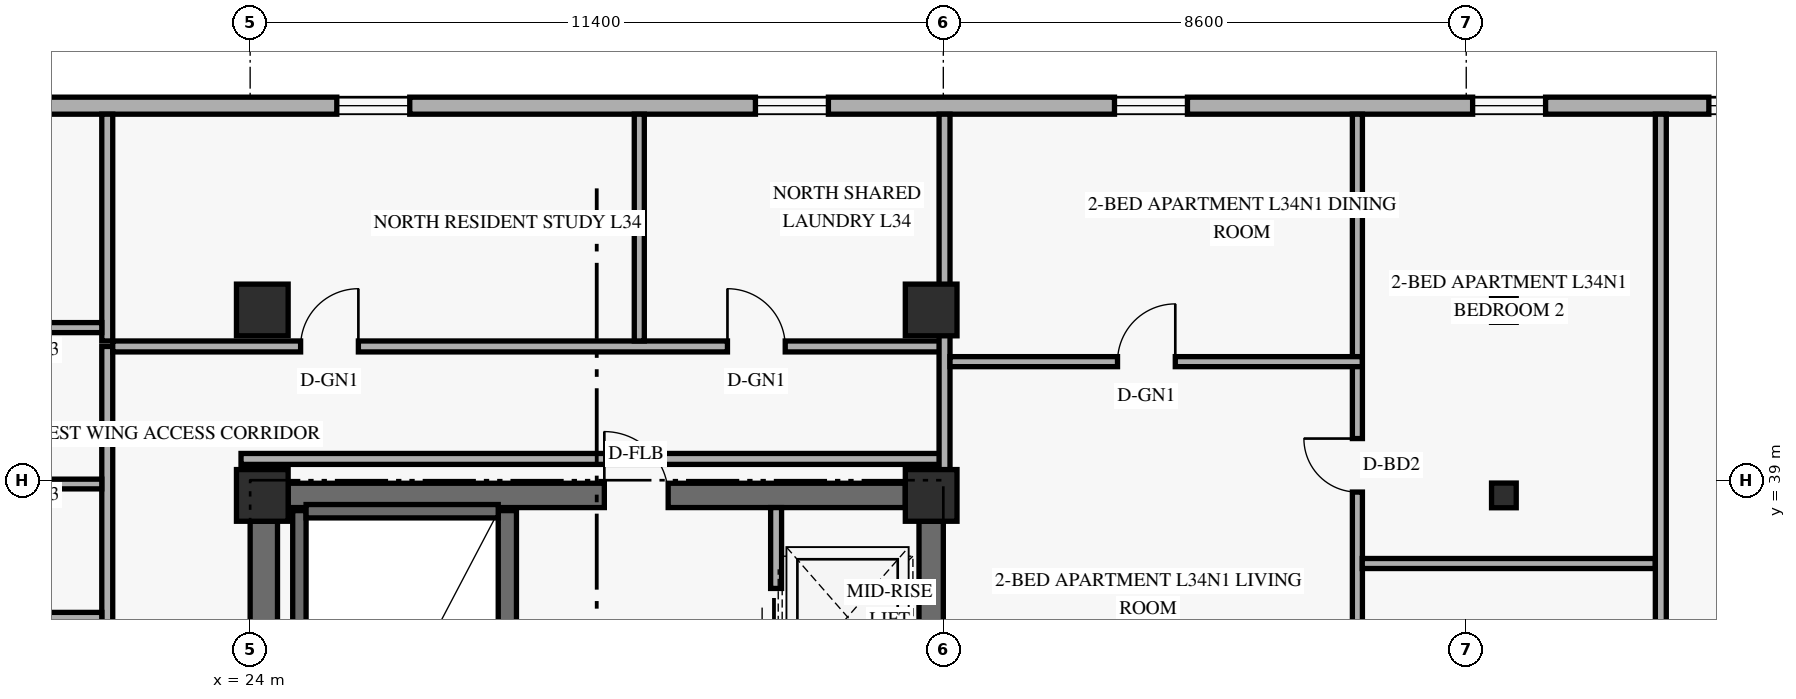
"""IFC4 building model, lengths in metres.
Left out: names, types, materials, properties, quantities, classifications, styles, units other than length and angle.
Written with IfcOpenShell. Run it as: python <this file> out.ifc"""

import sys

from ifc_helpers import new_model, si_unit, direction, frame, frame_2d, origin, origin_2d, place, context, subcontext, project, spatial, rectangle, hollow_rectangle, extrude, element, fill, save


model = new_model("IFC4")
c1 = context("Model", 3, precision=1e-05, world=origin(), true_north=direction((0.0, 1.0)))
c2 = subcontext(c1, "Body", "Model", "MODEL_VIEW")
j1 = project(units=[si_unit("LENGTHUNIT", "METRE"), si_unit("PLANEANGLEUNIT", "RADIAN")], contexts=[c1])
p1 = place(None, origin())
s1 = spatial("IfcSite", under=j1, at=p1, CompositionType="ELEMENT")
p2 = place(p1, origin())
s2 = spatial("IfcBuilding", under=s1, at=p2, CompositionType="ELEMENT")
p3 = place(p2, frame((0.0, 0.0, 132.0)))
s3 = spatial("IfcBuildingStorey", under=s2, at=p3, CompositionType="ELEMENT", Elevation=132.0)
p4 = place(p3, frame((24.225, 30.625, 0.0), z_axis=(0.0, 0.0, 1.0), x_axis=(0.0, 1.0, 0.0)))
e1 = element("IfcWall", 1, at=p4, inside=s3, PredefinedType="SHEAR", context=c2, shape_type="SweptSolid", body=[
    extrude(rectangle(XDim=7.7, YDim=0.45, at=frame_2d((3.85, 0.0))), origin(), (0.0, 0.0, 1.0), 2.689),
])
p5 = place(p3, frame((35.2, 31.35, 0.0), z_axis=(0.0, 0.0, 1.0), x_axis=(0.0, 1.0, 0.0)))
e2 = element("IfcWall", 2, at=p5, inside=s3, PredefinedType="SHEAR", context=c2, shape_type="SweptSolid", body=[
    extrude(rectangle(XDim=6.975, YDim=0.4, at=frame_2d((3.487, 0.0))), origin(), (0.0, 0.0, 1.0), 2.689),
])
p6 = place(p3, frame((24.625, 38.75, 0.0), z_axis=(0.0, 0.0, 1.0), x_axis=(1.0, 0.0, 0.0)))
e3 = element("IfcWall", 3, at=p6, inside=s3, PredefinedType="SHEAR", context=c2, shape_type="SweptSolid", body=[
    extrude(rectangle(XDim=10.15, YDim=0.4, at=frame_2d((5.075, 0.0))), origin(), (0.0, 0.0, 1.0), 3.3),
])
p7 = place(p6, frame((5.2, 0.0, 0.0)))
e4 = element("IfcOpeningElement", 4, at=p7, cuts=e3, PredefinedType="OPENING", context=c2, shape_type="SweptSolid", body=[
    extrude(rectangle(XDim=1.05, YDim=2.15, at=frame_2d((0.525, 1.075))), frame((0.0, 0.21, 0.0), z_axis=(0.0, -1.0, 0.0), x_axis=(1.0, 0.0, 0.0)), (0.0, 0.0, 1.0), 0.42),
])
p8 = place(p3, frame((24.81, 30.74, 0.0), z_axis=(0.0, 0.0, 1.0), x_axis=(0.0, 1.0, 0.0)))
e5 = element("IfcWall", 5, at=p8, inside=s3, PredefinedType="SHEAR", context=c2, shape_type="SweptSolid", body=[
    extrude(rectangle(XDim=7.76, YDim=0.22, at=frame_2d((3.88, 0.0))), origin(), (0.0, 0.0, 1.0), 3.3),
])
p9 = place(p3, frame((28.23, 30.74, 0.0), z_axis=(0.0, 0.0, 1.0), x_axis=(0.0, 1.0, 0.0)))
e6 = element("IfcWall", 6, at=p9, inside=s3, PredefinedType="SHEAR", context=c2, shape_type="SweptSolid", body=[
    extrude(rectangle(XDim=7.76, YDim=0.3, at=frame_2d((3.88, 0.0))), origin(), (0.0, 0.0, 1.0), 3.3),
])
p10 = place(p3, frame((24.92, 38.49, 0.0), z_axis=(0.0, 0.0, 1.0), x_axis=(1.0, 0.0, 0.0)))
e7 = element("IfcWall", 7, at=p10, inside=s3, PredefinedType="SHEAR", context=c2, shape_type="SweptSolid", body=[
    extrude(rectangle(XDim=3.16, YDim=0.22, at=frame_2d((1.58, 0.0))), origin(), (0.0, 0.0, 1.0), 3.3),
])
for number, where, z_axis, x_axis in (
    (8, (24.2, 38.75, 0.0), (0.0, 0.0, 1.0), (1.0, 0.0, 0.0)),
    (9, (24.2, 41.8, 0.0), (0.0, 0.0, 1.0), (1.0, 0.0, 0.0)),
    (10, (35.2, 38.75, 0.0), (0.0, 0.0, 1.0), (1.0, 0.0, 0.0)),
    (11, (35.2, 41.8, 0.0), (0.0, 0.0, 1.0), (1.0, 0.0, 0.0)),
):
    element("IfcColumn", number, at=place(p3, frame(where, z_axis=z_axis, x_axis=x_axis)), inside=s3, PredefinedType="COLUMN", context=c2, shape_type="SweptSolid", body=[
        extrude(rectangle(XDim=0.85, YDim=0.85, at=origin_2d()), origin(), (0.0, 0.0, 1.0), 3.6),
    ])
for number, where, z_axis, x_axis in (
    (12, (44.556, 38.75, 0.0), (0.035, 0.0, 0.999), (0.0, 1.0, 0.0)),
    (13, (44.556, 41.8, 0.0), (0.035, 0.0, 0.999), (0.0, 1.0, 0.0)),
):
    element("IfcColumn", number, at=place(p3, frame(where, z_axis=z_axis, x_axis=x_axis)), inside=s3, PredefinedType="COLUMN", context=c2, shape_type="SweptSolid", body=[
        extrude(hollow_rectangle(XDim=0.406, YDim=0.406, WallThickness=0.016, at=origin_2d()), origin(), (0.0, 0.0, 1.0), 3.602),
    ])
p11 = place(p3, frame((49.98, 45.16, 0.0), z_axis=(0.0, 0.0, 1.0), x_axis=(-1.0, 0.0, 0.0)))
e14 = element("IfcWall", 14, at=p11, inside=s3, PredefinedType="SOLIDWALL", context=c2, shape_type="SweptSolid", body=[
    extrude(rectangle(XDim=36.56, YDim=0.28, at=frame_2d((18.28, 0.0))), origin(), (0.0, 0.0, 1.0), 3.3),
])
p12 = place(p11, frame((31.845, 0.0, 0.85)))
e15 = element("IfcOpeningElement", 15, at=p12, cuts=e14, PredefinedType="OPENING", context=c2, shape_type="SweptSolid", body=[
    extrude(rectangle(XDim=1.2, YDim=1.5, at=frame_2d((0.6, 0.75))), frame((0.0, 0.15, 0.0), z_axis=(0.0, -1.0, 0.0), x_axis=(1.0, 0.0, 0.0)), (0.0, 0.0, 1.0), 0.3),
])
p13 = place(p11, frame((23.355, 0.0, 0.85)))
e16 = element("IfcOpeningElement", 16, at=p13, cuts=e14, PredefinedType="OPENING", context=c2, shape_type="SweptSolid", body=[
    extrude(rectangle(XDim=1.2, YDim=1.5, at=frame_2d((0.6, 0.75))), frame((0.0, 0.15, 0.0), z_axis=(0.0, -1.0, 0.0), x_axis=(1.0, 0.0, 0.0)), (0.0, 0.0, 1.0), 0.3),
])
p14 = place(p11, frame((16.47, 0.0, 0.85)))
e17 = element("IfcOpeningElement", 17, at=p14, cuts=e14, PredefinedType="OPENING", context=c2, shape_type="SweptSolid", body=[
    extrude(rectangle(XDim=1.2, YDim=1.5, at=frame_2d((0.6, 0.75))), frame((0.0, 0.15, 0.0), z_axis=(0.0, -1.0, 0.0), x_axis=(1.0, 0.0, 0.0)), (0.0, 0.0, 1.0), 0.3),
])
p15 = place(p11, frame((10.565, 0.0, 0.85)))
e18 = element("IfcOpeningElement", 18, at=p15, cuts=e14, PredefinedType="OPENING", context=c2, shape_type="SweptSolid", body=[
    extrude(rectangle(XDim=1.2, YDim=1.5, at=frame_2d((0.6, 0.75))), frame((0.0, 0.15, 0.0), z_axis=(0.0, -1.0, 0.0), x_axis=(1.0, 0.0, 0.0)), (0.0, 0.0, 1.0), 0.3),
])
p16 = place(p11, frame((4.675, 0.0, 0.85)))
e19 = element("IfcOpeningElement", 19, at=p16, cuts=e14, PredefinedType="OPENING", context=c2, shape_type="SweptSolid", body=[
    extrude(rectangle(XDim=1.2, YDim=1.5, at=frame_2d((0.6, 0.75))), frame((0.0, 0.15, 0.0), z_axis=(0.0, -1.0, 0.0), x_axis=(1.0, 0.0, 0.0)), (0.0, 0.0, 1.0), 0.3),
])
p17 = place(p11, frame((0.79, 0.0, 0.85)))
e20 = element("IfcOpeningElement", 20, at=p17, cuts=e14, PredefinedType="OPENING", context=c2, shape_type="SweptSolid", body=[
    extrude(rectangle(XDim=1.2, YDim=1.5, at=frame_2d((0.6, 0.75))), frame((0.0, 0.15, 0.0), z_axis=(0.0, -1.0, 0.0), x_axis=(1.0, 0.0, 0.0)), (0.0, 0.0, 1.0), 0.3),
])
p18 = place(p3, frame((32.65, 31.35, 0.0), z_axis=(0.0, 0.0, 1.0), x_axis=(0.0, 1.0, 0.0)))
e21 = element("IfcWall", 21, at=p18, inside=s3, PredefinedType="STANDARD", context=c2, shape_type="SweptSolid", body=[
    extrude(rectangle(XDim=7.2, YDim=0.18, at=frame_2d((3.6, 0.0))), origin(), (0.0, 0.0, 1.0), 3.3),
])
p19 = place(p18, frame((0.52, 0.0, 0.0)))
e22 = element("IfcOpeningElement", 22, at=p19, cuts=e21, PredefinedType="OPENING", context=c2, shape_type="SweptSolid", body=[
    extrude(rectangle(XDim=1.05, YDim=2.2, at=frame_2d((0.525, 1.1))), frame((0.0, 0.1, 0.0), z_axis=(0.0, -1.0, 0.0), x_axis=(1.0, 0.0, 0.0)), (0.0, 0.0, 1.0), 0.2),
])
p20 = place(p18, frame((2.67, 0.0, 0.0)))
e23 = element("IfcOpeningElement", 23, at=p20, cuts=e21, PredefinedType="OPENING", context=c2, shape_type="SweptSolid", body=[
    extrude(rectangle(XDim=1.05, YDim=2.2, at=frame_2d((0.525, 1.1))), frame((0.0, 0.1, 0.0), z_axis=(0.0, -1.0, 0.0), x_axis=(1.0, 0.0, 0.0)), (0.0, 0.0, 1.0), 0.2),
])
p21 = place(p18, frame((4.82, 0.0, 0.0)))
e24 = element("IfcOpeningElement", 24, at=p21, cuts=e21, PredefinedType="OPENING", context=c2, shape_type="SweptSolid", body=[
    extrude(rectangle(XDim=1.05, YDim=2.2, at=frame_2d((0.525, 1.1))), frame((0.0, 0.1, 0.0), z_axis=(0.0, -1.0, 0.0), x_axis=(1.0, 0.0, 0.0)), (0.0, 0.0, 1.0), 0.2),
])
p22 = place(p3, frame((21.65, 6.8, 0.0), z_axis=(0.0, 0.0, 1.0), x_axis=(0.0, 1.0, 0.0)))
e25 = element("IfcWall", 25, at=p22, inside=s3, PredefinedType="STANDARD", context=c2, shape_type="SweptSolid", body=[
    extrude(rectangle(XDim=34.4, YDim=0.18, at=frame_2d((17.2, 0.0))), origin(), (0.0, 0.0, 1.0), 2.671),
])
p23 = place(p22, frame((5.107, 0.0, 0.0)))
e26 = element("IfcOpeningElement", 26, at=p23, cuts=e25, PredefinedType="OPENING", context=c2, shape_type="SweptSolid", body=[
    extrude(rectangle(XDim=0.92, YDim=2.15, at=frame_2d((0.46, 1.075))), frame((0.0, 0.1, 0.0), z_axis=(0.0, -1.0, 0.0), x_axis=(1.0, 0.0, 0.0)), (0.0, 0.0, 1.0), 0.2),
])
p24 = place(p22, frame((13.99, 0.0, 0.0)))
e27 = element("IfcOpeningElement", 27, at=p24, cuts=e25, PredefinedType="OPENING", context=c2, shape_type="SweptSolid", body=[
    extrude(rectangle(XDim=0.92, YDim=2.15, at=frame_2d((0.46, 1.075))), frame((0.0, 0.1, 0.0), z_axis=(0.0, -1.0, 0.0), x_axis=(1.0, 0.0, 0.0)), (0.0, 0.0, 1.0), 0.2),
])
p25 = place(p22, frame((28.646, 0.0, 0.0)))
e28 = element("IfcOpeningElement", 28, at=p25, cuts=e25, PredefinedType="OPENING", context=c2, shape_type="SweptSolid", body=[
    extrude(rectangle(XDim=0.92, YDim=2.15, at=frame_2d((0.46, 1.075))), frame((0.0, 0.1, 0.0), z_axis=(0.0, -1.0, 0.0), x_axis=(1.0, 0.0, 0.0)), (0.0, 0.0, 1.0), 0.2),
])
p26 = place(p3, frame((21.74, 41.2, 0.0), z_axis=(0.0, 0.0, 1.0), x_axis=(1.0, 0.0, 0.0)))
e29 = element("IfcWall", 29, at=p26, inside=s3, PredefinedType="STANDARD", context=c2, shape_type="SweptSolid", body=[
    extrude(rectangle(XDim=13.68, YDim=0.18, at=frame_2d((6.84, 0.0))), origin(), (0.0, 0.0, 1.0), 2.671),
])
p27 = place(p26, frame((3.09, 0.0, 0.0)))
e30 = element("IfcOpeningElement", 30, at=p27, cuts=e29, PredefinedType="OPENING", context=c2, shape_type="SweptSolid", body=[
    extrude(rectangle(XDim=0.95, YDim=2.15, at=frame_2d((0.475, 1.075))), frame((0.0, 0.1, 0.0), z_axis=(0.0, -1.0, 0.0), x_axis=(1.0, 0.0, 0.0)), (0.0, 0.0, 1.0), 0.2),
])
p28 = place(p26, frame((10.11, 0.0, 0.0)))
e31 = element("IfcOpeningElement", 31, at=p28, cuts=e29, PredefinedType="OPENING", context=c2, shape_type="SweptSolid", body=[
    extrude(rectangle(XDim=0.95, YDim=2.15, at=frame_2d((0.475, 1.075))), frame((0.0, 0.1, 0.0), z_axis=(0.0, -1.0, 0.0), x_axis=(1.0, 0.0, 0.0)), (0.0, 0.0, 1.0), 0.2),
])
p29 = place(p3, frame((23.85, 39.35, 0.0), z_axis=(0.0, 0.0, 1.0), x_axis=(1.0, 0.0, 0.0)))
e32 = element("IfcWall", 32, at=p29, inside=s3, PredefinedType="STANDARD", context=c2, shape_type="SweptSolid", body=[
    extrude(rectangle(XDim=11.57, YDim=0.18, at=frame_2d((5.785, 0.0))), origin(), (0.0, 0.0, 1.0), 2.671),
])
p30 = place(p3, frame((21.65, 41.29, 0.0), z_axis=(0.0, 0.0, 1.0), x_axis=(0.0, 1.0, 0.0)))
e33 = element("IfcWall", 33, at=p30, inside=s3, PredefinedType="PARTITIONING", context=c2, shape_type="SweptSolid", body=[
    extrude(rectangle(XDim=3.73, YDim=0.18, at=frame_2d((1.865, 0.0))), origin(), (0.0, 0.0, 1.0), 2.749),
])
p31 = place(p3, frame((35.42, 38.75, 0.0), z_axis=(0.0, 0.0, 1.0), x_axis=(0.0, 1.0, 0.0)))
e34 = element("IfcWall", 34, at=p31, inside=s3, PredefinedType="PARTITIONING", context=c2, shape_type="SweptSolid", body=[
    extrude(rectangle(XDim=6.27, YDim=0.18, at=frame_2d((3.135, 0.0))), origin(), (0.0, 0.0, 1.0), 2.671),
])
p32 = place(p3, frame((42.21, 29.55, 0.0), z_axis=(0.0, 0.0, 1.0), x_axis=(0.0, 1.0, 0.0)))
e35 = element("IfcWall", 35, at=p32, inside=s3, PredefinedType="PARTITIONING", context=c2, shape_type="SweptSolid", body=[
    extrude(rectangle(XDim=15.47, YDim=0.165, at=frame_2d((7.735, 0.0))), origin(), (0.0, 0.0, 1.0), 2.671),
])
p33 = place(p32, frame((4.917, 0.0, 0.0)))
e36 = element("IfcOpeningElement", 36, at=p33, cuts=e35, PredefinedType="OPENING", context=c2, shape_type="SweptSolid", body=[
    extrude(rectangle(XDim=0.88, YDim=2.14, at=frame_2d((0.44, 1.07))), frame((0.0, 0.093, 0.0), z_axis=(0.0, -1.0, 0.0), x_axis=(1.0, 0.0, 0.0)), (0.0, 0.0, 1.0), 0.185),
])
p34 = place(p32, frame((9.255, 0.0, 0.0)))
e37 = element("IfcOpeningElement", 37, at=p34, cuts=e35, PredefinedType="OPENING", context=c2, shape_type="SweptSolid", body=[
    extrude(rectangle(XDim=0.88, YDim=2.14, at=frame_2d((0.44, 1.07))), frame((0.0, 0.093, 0.0), z_axis=(0.0, -1.0, 0.0), x_axis=(1.0, 0.0, 0.0)), (0.0, 0.0, 1.0), 0.185),
])
p35 = place(p3, frame((35.51, 40.95, 0.0), z_axis=(0.0, 0.0, 1.0), x_axis=(1.0, 0.0, 0.0)))
e38 = element("IfcWall", 38, at=p35, inside=s3, PredefinedType="PARTITIONING", context=c2, shape_type="SweptSolid", body=[
    extrude(rectangle(XDim=6.78, YDim=0.165, at=frame_2d((3.39, 0.0))), origin(), (0.0, 0.0, 1.0), 3.3),
])
p36 = place(p35, frame((2.755, 0.0, 0.0)))
e39 = element("IfcOpeningElement", 39, at=p36, cuts=e38, PredefinedType="OPENING", context=c2, shape_type="SweptSolid", body=[
    extrude(rectangle(XDim=0.95, YDim=2.15, at=frame_2d((0.475, 1.075))), frame((0.0, 0.093, 0.0), z_axis=(0.0, -1.0, 0.0), x_axis=(1.0, 0.0, 0.0)), (0.0, 0.0, 1.0), 0.185),
])
p37 = place(p3, frame((42.29, 37.63, 0.0), z_axis=(0.0, 0.0, 1.0), x_axis=(1.0, 0.0, 0.0)))
e40 = element("IfcWall", 40, at=p37, inside=s3, PredefinedType="PARTITIONING", context=c2, shape_type="SweptSolid", body=[
    extrude(rectangle(XDim=4.82, YDim=0.165, at=frame_2d((2.41, 0.0))), origin(), (0.0, 0.0, 1.0), 2.671),
])
p38 = place(p3, frame((47.2, 29.55, 0.0), z_axis=(0.0, 0.0, 1.0), x_axis=(0.0, 1.0, 0.0)))
e41 = element("IfcWall", 41, at=p38, inside=s3, PredefinedType="PARTITIONING", context=c2, shape_type="SweptSolid", body=[
    extrude(rectangle(XDim=15.47, YDim=0.18, at=frame_2d((7.735, 0.0))), origin(), (0.0, 0.0, 1.0), 2.671),
])
p39 = place(p3, frame((10.08, 41.51, 0.0), z_axis=(0.0, 0.0, 1.0), x_axis=(1.0, 0.0, 0.0)))
e42 = element("IfcWall", 42, at=p39, inside=s3, PredefinedType="PARTITIONING", context=c2, shape_type="SweptSolid", body=[
    extrude(rectangle(XDim=11.48, YDim=0.165, at=frame_2d((5.74, 0.0))), origin(), (0.0, 0.0, 1.0), 3.3),
])
p40 = place(p39, frame((2.41, 0.0, 0.0)))
e43 = element("IfcOpeningElement", 43, at=p40, cuts=e42, PredefinedType="OPENING", context=c2, shape_type="SweptSolid", body=[
    extrude(rectangle(XDim=0.9, YDim=2.14, at=frame_2d((0.45, 1.07))), frame((0.0, 0.093, 0.0), z_axis=(0.0, -1.0, 0.0), x_axis=(1.0, 0.0, 0.0)), (0.0, 0.0, 1.0), 0.185),
])
p41 = place(p3, frame((16.03, 36.746, 0.0), z_axis=(0.0, 0.0, 1.0), x_axis=(1.0, 0.0, 0.0)))
e44 = element("IfcWall", 44, at=p41, inside=s3, PredefinedType="PLUMBINGWALL", context=c2, shape_type="SweptSolid", body=[
    extrude(rectangle(XDim=5.53, YDim=0.16, at=frame_2d((2.765, 0.0))), origin(), (0.0, 0.0, 1.0), 2.671),
])
p42 = place(p3, frame((16.19, 38.938, 0.0), z_axis=(0.0, 0.0, 1.0), x_axis=(1.0, 0.0, 0.0)))
e45 = element("IfcWall", 45, at=p42, inside=s3, PredefinedType="PLUMBINGWALL", context=c2, shape_type="SweptSolid", body=[
    extrude(rectangle(XDim=5.37, YDim=0.16, at=frame_2d((2.685, 0.0))), origin(), (0.0, 0.0, 1.0), 2.671),
])
p43 = place(p3, frame((30.4, 41.29, 0.0), z_axis=(0.0, 0.0, 1.0), x_axis=(0.0, 1.0, 0.0)))
e46 = element("IfcWall", 46, at=p43, inside=s3, PredefinedType="PARTITIONING", context=c2, shape_type="SweptSolid", body=[
    extrude(rectangle(XDim=3.73, YDim=0.165, at=frame_2d((1.865, 0.0))), origin(), (0.0, 0.0, 1.0), 2.749),
])
p44 = place(p13, origin())
e47 = element("IfcWindow", 47, at=p44, inside=s3, PartitioningType="SINGLE_PANEL", PredefinedType="WINDOW", context=c2, shape_type="SweptSolid", body=[
    extrude(rectangle(XDim=1.2, YDim=1.5, at=frame_2d((0.6, 0.75))), frame((0.0, 0.03, 0.0), z_axis=(0.0, -1.0, 0.0), x_axis=(1.0, 0.0, 0.0)), (0.0, 0.0, 1.0), 0.06),
])
fill(e16, e47)
p45 = place(p14, origin())
e48 = element("IfcWindow", 48, at=p45, inside=s3, PartitioningType="SINGLE_PANEL", PredefinedType="WINDOW", context=c2, shape_type="SweptSolid", body=[
    extrude(rectangle(XDim=1.2, YDim=1.5, at=frame_2d((0.6, 0.75))), frame((0.0, 0.03, 0.0), z_axis=(0.0, -1.0, 0.0), x_axis=(1.0, 0.0, 0.0)), (0.0, 0.0, 1.0), 0.06),
])
fill(e17, e48)
p46 = place(p15, origin())
e49 = element("IfcWindow", 49, at=p46, inside=s3, PartitioningType="SINGLE_PANEL", PredefinedType="WINDOW", context=c2, shape_type="SweptSolid", body=[
    extrude(rectangle(XDim=1.2, YDim=1.5, at=frame_2d((0.6, 0.75))), frame((0.0, 0.03, 0.0), z_axis=(0.0, -1.0, 0.0), x_axis=(1.0, 0.0, 0.0)), (0.0, 0.0, 1.0), 0.06),
])
fill(e18, e49)
p47 = place(p16, origin())
e50 = element("IfcWindow", 50, at=p47, inside=s3, PartitioningType="SINGLE_PANEL", PredefinedType="WINDOW", context=c2, shape_type="SweptSolid", body=[
    extrude(rectangle(XDim=1.2, YDim=1.5, at=frame_2d((0.6, 0.75))), frame((0.0, 0.03, 0.0), z_axis=(0.0, -1.0, 0.0), x_axis=(1.0, 0.0, 0.0)), (0.0, 0.0, 1.0), 0.06),
])
fill(e19, e50)
p48 = place(p17, origin())
e51 = element("IfcWindow", 51, at=p48, inside=s3, PartitioningType="SINGLE_PANEL", PredefinedType="WINDOW", context=c2, shape_type="SweptSolid", body=[
    extrude(rectangle(XDim=1.2, YDim=1.5, at=frame_2d((0.6, 0.75))), frame((0.0, 0.03, 0.0), z_axis=(0.0, -1.0, 0.0), x_axis=(1.0, 0.0, 0.0)), (0.0, 0.0, 1.0), 0.06),
])
fill(e20, e51)
p49 = place(p21, origin())
e52 = element("IfcDoor", 52, at=p49, inside=s3, OperationType="SLIDING_TO_LEFT", PredefinedType="DOOR", context=c2, shape_type="SweptSolid", body=[
    extrude(rectangle(XDim=1.05, YDim=2.2, at=frame_2d((0.525, 1.1))), frame((0.0, 0.025, 0.0), z_axis=(0.0, -1.0, 0.0), x_axis=(1.0, 0.0, 0.0)), (0.0, 0.0, 1.0), 0.05),
])
fill(e24, e52)
p50 = place(p7, frame((1.05, 0.0, 0.0), z_axis=(0.0, 0.0, 1.0), x_axis=(-1.0, 0.0, 0.0)))
e53 = element("IfcDoor", 53, at=p50, inside=s3, OperationType="SINGLE_SWING_RIGHT", PredefinedType="DOOR", context=c2, shape_type="SweptSolid", body=[
    extrude(rectangle(XDim=1.05, YDim=2.15, at=frame_2d((0.525, 1.075))), frame((0.0, 0.025, 0.0), z_axis=(0.0, -1.0, 0.0), x_axis=(1.0, 0.0, 0.0)), (0.0, 0.0, 1.0), 0.05),
])
fill(e4, e53)
p51 = place(p36, origin())
e54 = element("IfcDoor", 54, at=p51, inside=s3, OperationType="SINGLE_SWING_RIGHT", PredefinedType="DOOR", context=c2, shape_type="SweptSolid", body=[
    extrude(rectangle(XDim=0.95, YDim=2.15, at=frame_2d((0.475, 1.075))), frame((0.0, 0.025, 0.0), z_axis=(0.0, -1.0, 0.0), x_axis=(1.0, 0.0, 0.0)), (0.0, 0.0, 1.0), 0.05),
])
fill(e39, e54)
p52 = place(p34, origin())
e55 = element("IfcDoor", 55, at=p52, inside=s3, OperationType="SINGLE_SWING_RIGHT", PredefinedType="DOOR", context=c2, shape_type="SweptSolid", body=[
    extrude(rectangle(XDim=0.88, YDim=2.14, at=frame_2d((0.44, 1.07))), frame((0.0, 0.025, 0.0), z_axis=(0.0, -1.0, 0.0), x_axis=(1.0, 0.0, 0.0)), (0.0, 0.0, 1.0), 0.05),
])
fill(e37, e55)
p53 = place(p27, origin())
e56 = element("IfcDoor", 56, at=p53, inside=s3, OperationType="SINGLE_SWING_RIGHT", PredefinedType="DOOR", context=c2, shape_type="SweptSolid", body=[
    extrude(rectangle(XDim=0.95, YDim=2.15, at=frame_2d((0.475, 1.075))), frame((0.0, 0.025, 0.0), z_axis=(0.0, -1.0, 0.0), x_axis=(1.0, 0.0, 0.0)), (0.0, 0.0, 1.0), 0.05),
])
fill(e30, e56)
p54 = place(p28, origin())
e57 = element("IfcDoor", 57, at=p54, inside=s3, OperationType="SINGLE_SWING_LEFT", PredefinedType="DOOR", context=c2, shape_type="SweptSolid", body=[
    extrude(rectangle(XDim=0.95, YDim=2.15, at=frame_2d((0.475, 1.075))), frame((0.0, 0.025, 0.0), z_axis=(0.0, -1.0, 0.0), x_axis=(1.0, 0.0, 0.0)), (0.0, 0.0, 1.0), 0.05),
])
fill(e31, e57)
save(model, sys.argv[1])
